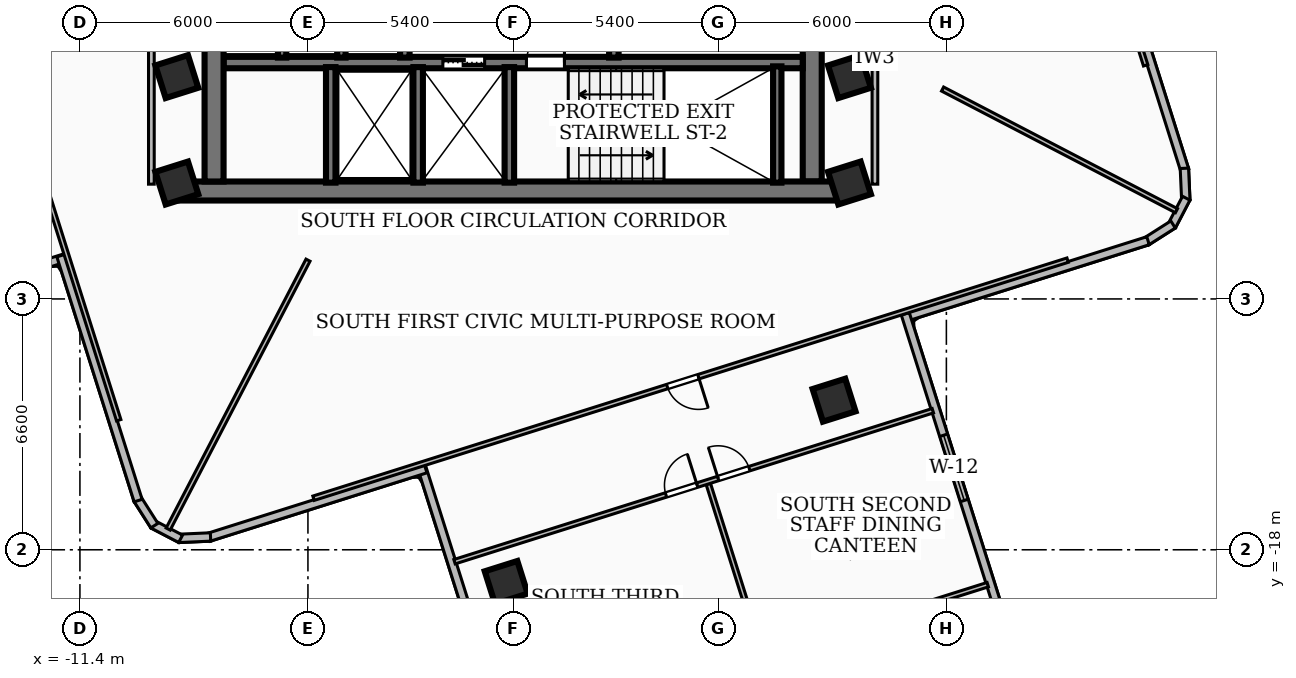
"""IFC4 building model, lengths in metres.
Left out: names, types, materials, properties, quantities, classifications, styles, units other than length and angle.
Written with IfcOpenShell. Run it as: python <this file> out.ifc"""

import sys

from ifc_helpers import new_model, si_unit, direction, frame, frame_2d, origin, origin_2d, place, context, subcontext, project, spatial, rectangle, extrude, element, fill, save


model = new_model("IFC4")
c1 = context("Model", 3, precision=1e-05, world=origin(), true_north=direction((0.0, 1.0)))
c2 = subcontext(c1, "Body", "Model", "MODEL_VIEW")
j1 = project(units=[si_unit("LENGTHUNIT", "METRE"), si_unit("PLANEANGLEUNIT", "RADIAN")], contexts=[c1])
p1 = place(None, origin())
s1 = spatial("IfcSite", under=j1, at=p1, CompositionType="ELEMENT")
p2 = place(p1, origin())
s2 = spatial("IfcBuilding", under=s1, at=p2, CompositionType="ELEMENT")
p3 = place(p2, frame((0.0, 0.0, 152.28)))
s3 = spatial("IfcBuildingStorey", under=s2, at=p3, CompositionType="ELEMENT", Elevation=152.28)
p4 = place(p3, frame((8.78, -8.56, 0.0), z_axis=(0.0, 0.0, 1.0), x_axis=(-1.0, 0.0, 0.0)))
e1 = element("IfcWall", 1, at=p4, inside=s3, PredefinedType="SHEAR", context=c2, shape_type="SweptSolid", body=[
    extrude(rectangle(XDim=17.56, YDim=0.5, at=frame_2d((8.78, 0.0))), origin(), (0.0, 0.0, 1.0), 3.34),
])
for number, where, z_axis, x_axis in (
    (2, (-7.87, -8.31, 0.0), (0.0, 0.0, 1.0), (0.0, 1.0, 0.0)),
    (3, (7.87, -2.0, 0.0), (0.0, 0.0, 1.0), (0.0, -1.0, 0.0)),
):
    element("IfcWall", number, at=place(p3, frame(where, z_axis=z_axis, x_axis=x_axis)), inside=s3, PredefinedType="SHEAR", context=c2, shape_type="SweptSolid", body=[
        extrude(rectangle(XDim=6.31, YDim=0.5, at=frame_2d((3.155, 0.0))), origin(), (0.0, 0.0, 1.0), 3.34),
    ])
p5 = place(p3, frame((-7.62, -5.18, 0.0), z_axis=(0.0, 0.0, 1.0), x_axis=(1.0, 0.0, 0.0)))
e4 = element("IfcWall", 4, at=p5, inside=s3, PredefinedType="SOLIDWALL", context=c2, shape_type="SweptSolid", body=[
    extrude(rectangle(XDim=15.24, YDim=0.3, at=frame_2d((7.62, 0.0))), origin(), (0.0, 0.0, 1.0), 3.34),
])
p6 = place(p5, frame((5.77, 0.0, 0.0)))
e5 = element("IfcOpeningElement", 5, at=p6, cuts=e4, PredefinedType="OPENING", context=c2, shape_type="SweptSolid", body=[
    extrude(rectangle(XDim=1.1, YDim=2.15, at=frame_2d((0.55, 1.075))), frame((0.0, 0.16, 0.0), z_axis=(0.0, -1.0, 0.0), x_axis=(1.0, 0.0, 0.0)), (0.0, 0.0, 1.0), 0.32),
])
p7 = place(p5, frame((7.97, 0.0, 0.0)))
e6 = element("IfcOpeningElement", 6, at=p7, cuts=e4, PredefinedType="OPENING", context=c2, shape_type="SweptSolid", body=[
    extrude(rectangle(XDim=1.0, YDim=2.1, at=frame_2d((0.5, 1.05))), frame((0.0, 0.16, 0.0), z_axis=(0.0, -1.0, 0.0), x_axis=(1.0, 0.0, 0.0)), (0.0, 0.0, 1.0), 0.32),
])
p8 = place(p3, frame((6.95, -8.34, 0.0), z_axis=(0.0, 0.0, 1.0), x_axis=(0.0, 1.0, 0.0)))
e7 = element("IfcWall", 7, at=p8, inside=s3, PredefinedType="SOLIDWALL", context=c2, shape_type="SweptSolid", body=[
    extrude(rectangle(XDim=3.06, YDim=0.22, at=frame_2d((1.53, 0.0))), origin(), (0.0, 0.0, 1.0), 3.34),
])
for number, where, z_axis, x_axis in (
    (8, (-0.1, -8.34, 0.0), (0.0, 0.0, 1.0), (0.0, 1.0, 0.0)),
    (9, (-2.5, -8.34, 0.0), (0.0, 0.0, 1.0), (0.0, 1.0, 0.0)),
    (10, (-4.8, -8.34, 0.0), (0.0, 0.0, 1.0), (0.0, 1.0, 0.0)),
):
    element("IfcWall", number, at=place(p3, frame(where, z_axis=z_axis, x_axis=x_axis)), inside=s3, PredefinedType="SOLIDWALL", context=c2, shape_type="SweptSolid", body=[
        extrude(rectangle(XDim=3.04, YDim=0.25, at=frame_2d((1.52, 0.0))), origin(), (0.0, 0.0, 1.0), 3.34),
    ])
for number, where, z_axis, x_axis in (
    (11, (-2.85, -5.05, 0.0), (0.0, 0.0, 1.0), (0.0, 1.0, 0.0)),
    (12, (2.65, -5.05, 0.0), (0.0, 0.0, 1.0), (0.0, 1.0, 0.0)),
):
    element("IfcWall", number, at=place(p3, frame(where, z_axis=z_axis, x_axis=x_axis)), inside=s3, PredefinedType="SOLIDWALL", context=c2, shape_type="SweptSolid", body=[
        extrude(rectangle(XDim=3.07, YDim=0.25, at=frame_2d((1.535, 0.0))), origin(), (0.0, 0.0, 1.0), 3.34),
    ])
for number, where, z_axis, x_axis in (
    (13, (-6.08, -5.05, 0.0), (0.0, 0.0, 1.0), (0.0, 1.0, 0.0)),
    (14, (-4.52, -5.05, 0.0), (0.0, 0.0, 1.0), (0.0, 1.0, 0.0)),
):
    element("IfcWall", number, at=place(p3, frame(where, z_axis=z_axis, x_axis=x_axis)), inside=s3, PredefinedType="SOLIDWALL", context=c2, shape_type="SweptSolid", body=[
        extrude(rectangle(XDim=3.07, YDim=0.22, at=frame_2d((1.535, 0.0))), origin(), (0.0, 0.0, 1.0), 3.34),
    ])
for number, where, z_axis, x_axis in (
    (15, (-8.85, -5.55, 0.0), (0.0, 0.0, 1.0), (0.954, 0.301, 0.0)),
    (16, (8.85, -5.55, 0.0), (0.0, 0.0, 1.0), (0.954, 0.301, 0.0)),
    (17, (8.85, -8.35, 0.0), (0.0, 0.0, 1.0), (0.954, 0.301, 0.0)),
    (18, (-8.85, -8.35, 0.0), (0.0, 0.0, 1.0), (0.954, 0.301, 0.0)),
    (19, (-0.183, -18.86, 0.0), (0.0, 0.0, 1.0), (0.954, 0.301, 0.0)),
    (20, (8.445, -14.064, 0.0), (0.0, 0.0, 1.0), (0.954, 0.301, 0.0)),
    (21, (9.208, -17.615, 0.0), (0.0, 0.0, 1.0), (0.954, 0.301, 0.0)),
):
    element("IfcColumn", number, at=place(p3, frame(where, z_axis=z_axis, x_axis=x_axis)), inside=s3, PredefinedType="COLUMN", context=c2, shape_type="SweptSolid", body=[
        extrude(rectangle(XDim=0.9, YDim=0.9, at=origin_2d()), origin(), (0.0, 0.0, 1.0), 3.6),
    ])
p9 = place(p3, frame((-11.792, -10.319, 0.0), z_axis=(0.0, 0.0, 1.0), x_axis=(-0.953607060649, -0.301054104573, 0.0)))
e22 = element("IfcWall", 22, at=p9, inside=s3, PredefinedType="SOLIDWALL", context=c2, shape_type="SweptSolid", body=[
    extrude(rectangle(XDim=13.459, YDim=0.22, at=frame_2d((6.73, 0.0))), origin(), (0.0, 0.0, 1.0), 2.152),
])
p10 = place(p3, frame((15.87, -2.301, 0.0), z_axis=(0.0, 0.0, 1.0), x_axis=(0.300910882413, -0.953652264112, 0.0)))
e23 = element("IfcWall", 23, at=p10, inside=s3, PredefinedType="SOLIDWALL", context=c2, shape_type="SweptSolid", body=[
    extrude(rectangle(XDim=5.989, YDim=0.22, at=frame_2d((2.994, 0.0))), origin(), (0.0, 0.0, 1.0), 3.34),
])
p11 = place(p3, frame((17.663, -7.963, 0.0), z_axis=(0.0, 0.0, 1.0), x_axis=(0.044147725226, -0.99902501388, 0.0)))
e24 = element("IfcWall", 24, at=p11, inside=s3, PredefinedType="SOLIDWALL", context=c2, shape_type="SweptSolid", body=[
    extrude(rectangle(XDim=0.835, YDim=0.22, at=frame_2d((0.417, 0.0))), origin(), (0.0, 0.0, 1.0), 3.34),
])
p12 = place(p3, frame((17.711, -8.75, 0.0), z_axis=(0.0, 0.0, 1.0), x_axis=(-0.462647505427, -0.886542320322, 0.0)))
e25 = element("IfcWall", 25, at=p12, inside=s3, PredefinedType="SOLIDWALL", context=c2, shape_type="SweptSolid", body=[
    extrude(rectangle(XDim=0.819, YDim=0.22, at=frame_2d((0.41, 0.0))), origin(), (0.0, 0.0, 1.0), 3.34),
])
p13 = place(p3, frame((17.365, -9.441, 0.0), z_axis=(0.0, 0.0, 1.0), x_axis=(-0.84369762364, -0.536818702975, 0.0)))
e26 = element("IfcWall", 26, at=p13, inside=s3, PredefinedType="SOLIDWALL", context=c2, shape_type="SweptSolid", body=[
    extrude(rectangle(XDim=0.834, YDim=0.22, at=frame_2d((0.417, 0.0))), origin(), (0.0, 0.0, 1.0), 3.34),
])
p14 = place(p3, frame((16.706, -9.868, 0.0), z_axis=(0.0, 0.0, 1.0), x_axis=(-0.953629605256, -0.300982683852, 0.0)))
e27 = element("IfcWall", 27, at=p14, inside=s3, PredefinedType="SOLIDWALL", context=c2, shape_type="SweptSolid", body=[
    extrude(rectangle(XDim=6.759, YDim=0.22, at=frame_2d((3.379, 0.0))), origin(), (0.0, 0.0, 1.0), 3.34),
])
p15 = place(p3, frame((10.319, -11.792, 0.0), z_axis=(0.0, 0.0, 1.0), x_axis=(0.301051082334, -0.953608014766, 0.0)))
e28 = element("IfcWall", 28, at=p15, inside=s3, PredefinedType="SOLIDWALL", context=c2, shape_type="SweptSolid", body=[
    extrude(rectangle(XDim=9.46, YDim=0.22, at=frame_2d((4.73, 0.0))), origin(), (0.0, 0.0, 1.0), 3.34),
])
p16 = place(p15, frame((3.35, 0.0, 0.85)))
e29 = element("IfcOpeningElement", 29, at=p16, cuts=e28, PredefinedType="OPENING", context=c2, shape_type="SweptSolid", body=[
    extrude(rectangle(XDim=1.8, YDim=1.6, at=frame_2d((0.9, 0.8))), frame((0.0, 0.12, 0.0), z_axis=(0.0, -1.0, 0.0), x_axis=(1.0, 0.0, 0.0)), (0.0, 0.0, 1.0), 0.24),
])
p17 = place(p3, frame((0.436, -24.831, 0.0), z_axis=(0.0, 0.0, 1.0), x_axis=(-0.301016470916, 0.953618940792, 0.0)))
e30 = element("IfcWall", 30, at=p17, inside=s3, PredefinedType="SOLIDWALL", context=c2, shape_type="SweptSolid", body=[
    extrude(rectangle(XDim=9.458, YDim=0.22, at=frame_2d((4.729, 0.0))), origin(), (0.0, 0.0, 1.0), 2.152),
])
p18 = place(p3, frame((-2.301, -15.87, 0.0), z_axis=(0.0, 0.0, 1.0), x_axis=(-0.953652264112, -0.300910882413, 0.0)))
e31 = element("IfcWall", 31, at=p18, inside=s3, PredefinedType="SOLIDWALL", context=c2, shape_type="SweptSolid", body=[
    extrude(rectangle(XDim=5.989, YDim=0.22, at=frame_2d((2.994, 0.0))), origin(), (0.0, 0.0, 1.0), 2.152),
])
p19 = place(p3, frame((-7.963, -17.663, 0.0), z_axis=(0.0, 0.0, 1.0), x_axis=(-0.99902501388, -0.044147725226, 0.0)))
e32 = element("IfcWall", 32, at=p19, inside=s3, PredefinedType="SOLIDWALL", context=c2, shape_type="SweptSolid", body=[
    extrude(rectangle(XDim=0.835, YDim=0.22, at=frame_2d((0.417, 0.0))), origin(), (0.0, 0.0, 1.0), 3.34),
])
p20 = place(p3, frame((-8.75, -17.711, 0.0), z_axis=(0.0, 0.0, 1.0), x_axis=(-0.886542320322, 0.462647505427, 0.0)))
e33 = element("IfcWall", 33, at=p20, inside=s3, PredefinedType="SOLIDWALL", context=c2, shape_type="SweptSolid", body=[
    extrude(rectangle(XDim=0.819, YDim=0.22, at=frame_2d((0.41, 0.0))), origin(), (0.0, 0.0, 1.0), 3.34),
])
p21 = place(p3, frame((-9.441, -17.365, 0.0), z_axis=(0.0, 0.0, 1.0), x_axis=(-0.536818702975, 0.84369762364, 0.0)))
e34 = element("IfcWall", 34, at=p21, inside=s3, PredefinedType="SOLIDWALL", context=c2, shape_type="SweptSolid", body=[
    extrude(rectangle(XDim=0.834, YDim=0.22, at=frame_2d((0.417, 0.0))), origin(), (0.0, 0.0, 1.0), 3.34),
])
p22 = place(p3, frame((-9.868, -16.706, 0.0), z_axis=(0.0, 0.0, 1.0), x_axis=(-0.300982683852, 0.953629605256, 0.0)))
e35 = element("IfcWall", 35, at=p22, inside=s3, PredefinedType="SOLIDWALL", context=c2, shape_type="SweptSolid", body=[
    extrude(rectangle(XDim=6.759, YDim=0.22, at=frame_2d((3.379, 0.0))), origin(), (0.0, 0.0, 1.0), 2.152),
])
for number, where, z_axis, x_axis in (
    (36, (-9.52, -8.38, 0.0), (0.0, 0.0, 1.0), (0.0, 1.0, 0.0)),
    (37, (9.52, -8.38, 0.0), (0.0, 0.0, 1.0), (0.0, 1.0, 0.0)),
):
    element("IfcWall", number, at=place(p3, frame(where, z_axis=z_axis, x_axis=x_axis)), inside=s3, PredefinedType="PARTITIONING", context=c2, shape_type="SweptSolid", body=[
        extrude(rectangle(XDim=6.63, YDim=0.15, at=frame_2d((3.315, 0.0))), origin(), (0.0, 0.0, 1.0), 2.152),
    ])
p23 = place(p3, frame((-5.398, -10.38, 0.0), z_axis=(0.0, 0.0, 1.0), x_axis=(-0.461434665806, -0.887174193263, 0.0)))
e38 = element("IfcWall", 38, at=p23, inside=s3, PredefinedType="PARTITIONING", context=c2, shape_type="SweptSolid", body=[
    extrude(rectangle(XDim=7.975, YDim=0.12, at=frame_2d((3.988, 0.0))), origin(), (0.0, 0.0, 1.0), 2.152),
])
p24 = place(p3, frame((11.3, -5.877, 0.0), z_axis=(0.0, 0.0, 1.0), x_axis=(0.887198362964, -0.461388193123, 0.0)))
e39 = element("IfcWall", 39, at=p24, inside=s3, PredefinedType="PARTITIONING", context=c2, shape_type="SweptSolid", body=[
    extrude(rectangle(XDim=6.938, YDim=0.12, at=frame_2d((3.469, 0.0))), origin(), (0.0, 0.0, 1.0), 3.34),
])
p25 = place(p3, frame((10.379, 14.591, 0.0), z_axis=(0.0, 0.0, 1.0), x_axis=(0.301070726534, -0.95360181293, 0.0)))
e40 = element("IfcWall", 40, at=p25, inside=s3, PredefinedType="PARTITIONING", context=c2, shape_type="SweptSolid", body=[
    extrude(rectangle(XDim=20.81, YDim=0.12, at=frame_2d((10.405, 0.0))), origin(), (0.0, 0.0, 1.0), 2.152),
])
p26 = place(p25, frame((10.189, 0.0, 0.0)))
e41 = element("IfcOpeningElement", 41, at=p26, cuts=e40, PredefinedType="OPENING", context=c2, shape_type="SweptSolid", body=[
    extrude(rectangle(XDim=0.86, YDim=2.0, at=frame_2d((0.43, 1.0))), frame((0.0, 0.07, 0.0), z_axis=(0.0, -1.0, 0.0), x_axis=(1.0, 0.0, 0.0)), (0.0, 0.0, 1.0), 0.14),
])
p27 = place(p3, frame((-10.379, -14.591, 0.0), z_axis=(0.0, 0.0, 1.0), x_axis=(-0.301070726534, 0.95360181293, 0.0)))
e42 = element("IfcWall", 42, at=p27, inside=s3, PredefinedType="PARTITIONING", context=c2, shape_type="SweptSolid", body=[
    extrude(rectangle(XDim=20.81, YDim=0.12, at=frame_2d((10.405, 0.0))), origin(), (0.0, 0.0, 1.0), 2.152),
])
p28 = place(p27, frame((10.189, 0.0, 0.0)))
e43 = element("IfcOpeningElement", 43, at=p28, cuts=e42, PredefinedType="OPENING", context=c2, shape_type="SweptSolid", body=[
    extrude(rectangle(XDim=0.86, YDim=2.0, at=frame_2d((0.43, 1.0))), frame((0.0, 0.07, 0.0), z_axis=(0.0, -1.0, 0.0), x_axis=(1.0, 0.0, 0.0)), (0.0, 0.0, 1.0), 0.14),
])
p29 = place(p3, frame((14.591, -10.379, 0.0), z_axis=(0.0, 0.0, 1.0), x_axis=(-0.95360181293, -0.301070726534, 0.0)))
e44 = element("IfcWall", 44, at=p29, inside=s3, PredefinedType="PARTITIONING", context=c2, shape_type="SweptSolid", body=[
    extrude(rectangle(XDim=20.81, YDim=0.12, at=frame_2d((10.405, 0.0))), origin(), (0.0, 0.0, 1.0), 2.152),
])
p30 = place(p29, frame((10.189, 0.0, 0.0)))
e45 = element("IfcOpeningElement", 45, at=p30, cuts=e44, PredefinedType="OPENING", context=c2, shape_type="SweptSolid", body=[
    extrude(rectangle(XDim=0.86, YDim=2.0, at=frame_2d((0.43, 1.0))), frame((0.0, 0.07, 0.0), z_axis=(0.0, -1.0, 0.0), x_axis=(1.0, 0.0, 0.0)), (0.0, 0.0, 1.0), 0.14),
])
p31 = place(p3, frame((5.136, -16.269, 0.0), z_axis=(0.0, 0.0, 1.0), x_axis=(0.301053971024, -0.953607102811, 0.0)))
e46 = element("IfcWall", 46, at=p31, inside=s3, PredefinedType="PARTITIONING", context=c2, shape_type="SweptSolid", body=[
    extrude(rectangle(XDim=4.68, YDim=0.12, at=frame_2d((2.34, 0.0))), origin(), (0.0, 0.0, 1.0), 2.152),
])
p32 = place(p3, frame((-1.543, -18.314, 0.0), z_axis=(0.0, 0.0, 1.0), x_axis=(0.953624308899, 0.300999464247, 0.0)))
e47 = element("IfcWall", 47, at=p32, inside=s3, PredefinedType="PARTITIONING", context=c2, shape_type="SweptSolid", body=[
    extrude(rectangle(XDim=13.199, YDim=0.12, at=frame_2d((6.6, 0.0))), origin(), (0.0, 0.0, 1.0), 2.152),
])
p33 = place(p32, frame((5.835, 0.0, 0.0)))
e48 = element("IfcOpeningElement", 48, at=p33, cuts=e47, PredefinedType="OPENING", context=c2, shape_type="SweptSolid", body=[
    extrude(rectangle(XDim=0.86, YDim=2.04, at=frame_2d((0.43, 1.02))), frame((0.0, 0.07, 0.0), z_axis=(0.0, -1.0, 0.0), x_axis=(1.0, 0.0, 0.0)), (0.0, 0.0, 1.0), 0.14),
])
p34 = place(p32, frame((7.275, 0.0, 0.0)))
e49 = element("IfcOpeningElement", 49, at=p34, cuts=e47, PredefinedType="OPENING", context=c2, shape_type="SweptSolid", body=[
    extrude(rectangle(XDim=0.86, YDim=2.04, at=frame_2d((0.43, 1.02))), frame((0.0, 0.07, 0.0), z_axis=(0.0, -1.0, 0.0), x_axis=(1.0, 0.0, 0.0)), (0.0, 0.0, 1.0), 0.14),
])
p35 = place(p3, frame((12.489, -18.918, 0.0), z_axis=(0.0, 0.0, 1.0), x_axis=(-0.953597759193, -0.301083565912, 0.0)))
e50 = element("IfcWall", 50, at=p35, inside=s3, PredefinedType="PARTITIONING", context=c2, shape_type="SweptSolid", body=[
    extrude(rectangle(XDim=13.199, YDim=0.12, at=frame_2d((6.6, 0.0))), origin(), (0.0, 0.0, 1.0), 2.152),
])
p36 = place(p35, frame((4.94, 0.0, 0.0)))
e51 = element("IfcOpeningElement", 51, at=p36, cuts=e50, PredefinedType="OPENING", context=c2, shape_type="SweptSolid", body=[
    extrude(rectangle(XDim=1.05, YDim=2.08, at=frame_2d((0.525, 1.04))), frame((0.0, 0.07, 0.0), z_axis=(0.0, -1.0, 0.0), x_axis=(1.0, 0.0, 0.0)), (0.0, 0.0, 1.0), 0.14),
])
p37 = place(p16, origin())
e52 = element("IfcWindow", 52, at=p37, inside=s3, PartitioningType="SINGLE_PANEL", PredefinedType="WINDOW", context=c2, shape_type="SweptSolid", body=[
    extrude(rectangle(XDim=1.8, YDim=1.6, at=frame_2d((0.9, 0.8))), frame((0.0, 0.03, 0.0), z_axis=(0.0, -1.0, 0.0), x_axis=(1.0, 0.0, 0.0)), (0.0, 0.0, 1.0), 0.06),
])
fill(e29, e52)
p38 = place(p6, origin())
e53 = element("IfcDoor", 53, at=p38, inside=s3, OperationType="DOUBLE_DOOR_SLIDING", PredefinedType="DOOR", context=c2, shape_type="SweptSolid", body=[
    extrude(rectangle(XDim=1.1, YDim=2.15, at=frame_2d((0.55, 1.075))), frame((0.0, 0.025, 0.0), z_axis=(0.0, -1.0, 0.0), x_axis=(1.0, 0.0, 0.0)), (0.0, 0.0, 1.0), 0.05),
])
fill(e5, e53)
p39 = place(p7, origin())
e54 = element("IfcDoor", 54, at=p39, inside=s3, OperationType="SINGLE_SWING_RIGHT", PredefinedType="DOOR", context=c2, shape_type="SweptSolid", body=[
    extrude(rectangle(XDim=1.0, YDim=2.1, at=frame_2d((0.5, 1.05))), frame((0.0, 0.025, 0.0), z_axis=(0.0, -1.0, 0.0), x_axis=(1.0, 0.0, 0.0)), (0.0, 0.0, 1.0), 0.05),
])
fill(e6, e54)
p40 = place(p30, origin())
e55 = element("IfcDoor", 55, at=p40, inside=s3, OperationType="SINGLE_SWING_LEFT", PredefinedType="DOOR", context=c2, shape_type="SweptSolid", body=[
    extrude(rectangle(XDim=0.86, YDim=2.0, at=frame_2d((0.43, 1.0))), frame((0.0, 0.025, 0.0), z_axis=(0.0, -1.0, 0.0), x_axis=(1.0, 0.0, 0.0)), (0.0, 0.0, 1.0), 0.05),
])
fill(e45, e55)
p41 = place(p33, origin())
e56 = element("IfcDoor", 56, at=p41, inside=s3, OperationType="SINGLE_SWING_RIGHT", PredefinedType="DOOR", context=c2, shape_type="SweptSolid", body=[
    extrude(rectangle(XDim=0.86, YDim=2.04, at=frame_2d((0.43, 1.02))), frame((0.0, 0.025, 0.0), z_axis=(0.0, -1.0, 0.0), x_axis=(1.0, 0.0, 0.0)), (0.0, 0.0, 1.0), 0.05),
])
fill(e48, e56)
p42 = place(p34, origin())
e57 = element("IfcDoor", 57, at=p42, inside=s3, OperationType="SINGLE_SWING_LEFT", PredefinedType="DOOR", context=c2, shape_type="SweptSolid", body=[
    extrude(rectangle(XDim=0.86, YDim=2.04, at=frame_2d((0.43, 1.02))), frame((0.0, 0.025, 0.0), z_axis=(0.0, -1.0, 0.0), x_axis=(1.0, 0.0, 0.0)), (0.0, 0.0, 1.0), 0.05),
])
fill(e49, e57)
save(model, sys.argv[1])
